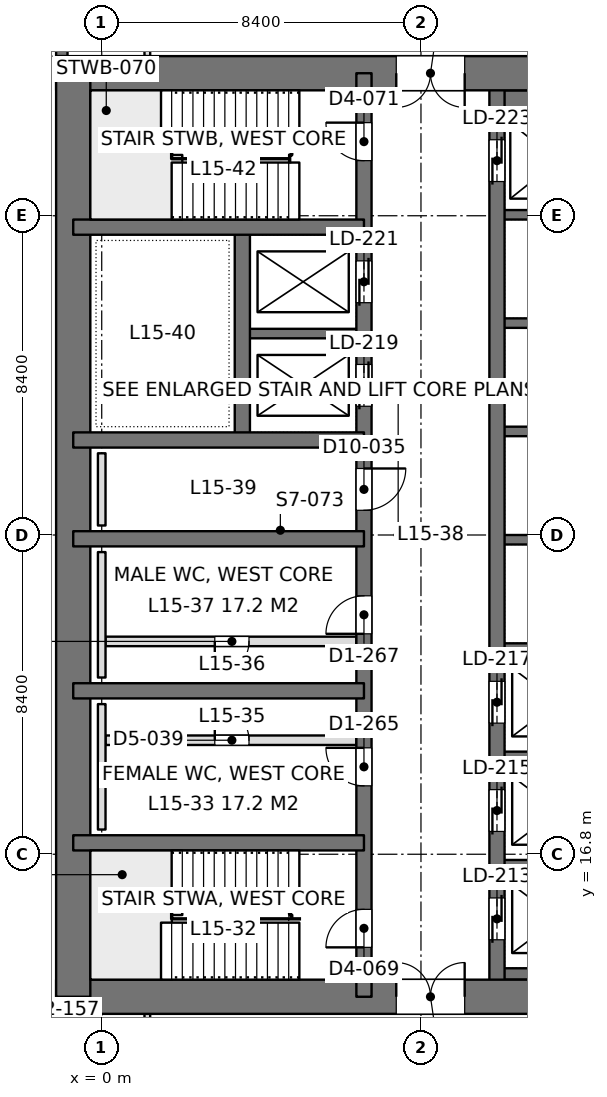
"""IFC4 building model, lengths in metres.
Left out: names, types, materials, properties, quantities, classifications, styles, units other than length and angle.
Written with IfcOpenShell. Run it as: python <this file> out.ifc"""

import sys

from ifc_helpers import new_model, si_unit, direction, frame, frame_2d, origin, place, context, subcontext, project, spatial, rectangle, extrude, element, fill, save


model = new_model("IFC4")
c1 = context("Model", 3, precision=1e-05, world=origin(), true_north=direction((0.0, 1.0)))
c2 = subcontext(c1, "Body", "Model", "MODEL_VIEW")
j1 = project(units=[si_unit("LENGTHUNIT", "METRE"), si_unit("PLANEANGLEUNIT", "RADIAN")], contexts=[c1])
p1 = place(None, origin())
s1 = spatial("IfcSite", under=j1, at=p1, CompositionType="ELEMENT")
p2 = place(p1, origin())
s2 = spatial("IfcBuilding", under=s1, at=p2, CompositionType="ELEMENT")
p3 = place(p2, frame((0.0, 0.0, 68.4)))
s3 = spatial("IfcBuildingStorey", under=s2, at=p3, CompositionType="ELEMENT", Elevation=68.4)
p4 = place(p3, frame((-1.2, 13.05, 0.0), z_axis=(0.0, 0.0, 1.0), x_axis=(1.0, 0.0, 0.0)))
e1 = element("IfcWall", 1, at=p4, inside=s3, PredefinedType="SHEAR", context=c2, shape_type="SweptSolid", body=[
    extrude(rectangle(XDim=18.0, YDim=0.9, at=frame_2d((9.0, 0.0))), origin(), (0.0, 0.0, 1.0), 4.5),
])
p5 = place(p4, frame((8.95, 0.0, 0.0)))
e2 = element("IfcOpeningElement", 2, at=p5, cuts=e1, PredefinedType="OPENING", context=c2, shape_type="SweptSolid", body=[
    extrude(rectangle(XDim=1.8, YDim=2.4, at=frame_2d((0.9, 1.2))), frame((0.0, 0.46, 0.0), z_axis=(0.0, -1.0, 0.0), x_axis=(1.0, 0.0, 0.0)), (0.0, 0.0, 1.0), 0.92),
])
p6 = place(p3, frame((-1.2, 37.35, 0.0), z_axis=(0.0, 0.0, 1.0), x_axis=(1.0, 0.0, 0.0)))
e3 = element("IfcWall", 3, at=p6, inside=s3, PredefinedType="SHEAR", context=c2, shape_type="SweptSolid", body=[
    extrude(rectangle(XDim=18.0, YDim=0.9, at=frame_2d((9.0, 0.0))), origin(), (0.0, 0.0, 1.0), 4.5),
])
p7 = place(p6, frame((8.95, 0.0, 0.0)))
e4 = element("IfcOpeningElement", 4, at=p7, cuts=e3, PredefinedType="OPENING", context=c2, shape_type="SweptSolid", body=[
    extrude(rectangle(XDim=1.8, YDim=2.4, at=frame_2d((0.9, 1.2))), frame((0.0, 0.46, 0.0), z_axis=(0.0, -1.0, 0.0), x_axis=(1.0, 0.0, 0.0)), (0.0, 0.0, 1.0), 0.92),
])
p8 = place(p3, frame((-0.75, 13.05, 0.0), z_axis=(0.0, 0.0, 1.0), x_axis=(0.0, 1.0, 0.0)))
e5 = element("IfcWall", 5, at=p8, inside=s3, PredefinedType="SHEAR", context=c2, shape_type="SweptSolid", body=[
    extrude(rectangle(XDim=24.3, YDim=0.9, at=frame_2d((12.15, 0.0))), origin(), (0.0, 0.0, 1.0), 4.5),
])
p9 = place(p3, frame((6.9, 13.05, 0.0), z_axis=(0.0, 0.0, 1.0), x_axis=(0.0, 1.0, 0.0)))
e6 = element("IfcWall", 6, at=p9, inside=s3, PredefinedType="SHEAR", context=c2, shape_type="SweptSolid", body=[
    extrude(rectangle(XDim=24.3, YDim=0.4, at=frame_2d((12.15, 0.0))), origin(), (0.0, 0.0, 1.0), 4.5),
])
p10 = place(p9, frame((1.3, 0.0, 0.0)))
e7 = element("IfcOpeningElement", 7, at=p10, cuts=e6, PredefinedType="OPENING", context=c2, shape_type="SweptSolid", body=[
    extrude(rectangle(XDim=1.0, YDim=2.2, at=frame_2d((0.5, 1.1))), frame((0.0, 0.21, 0.0), z_axis=(0.0, -1.0, 0.0), x_axis=(1.0, 0.0, 0.0)), (0.0, 0.0, 1.0), 0.42),
])
p11 = place(p9, frame((22.0, 0.0, 0.0)))
e8 = element("IfcOpeningElement", 8, at=p11, cuts=e6, PredefinedType="OPENING", context=c2, shape_type="SweptSolid", body=[
    extrude(rectangle(XDim=1.0, YDim=2.2, at=frame_2d((0.5, 1.1))), frame((0.0, 0.21, 0.0), z_axis=(0.0, -1.0, 0.0), x_axis=(1.0, 0.0, 0.0)), (0.0, 0.0, 1.0), 0.42),
])
p12 = place(p9, frame((5.55, 0.0, 0.0)))
e9 = element("IfcOpeningElement", 9, at=p12, cuts=e6, PredefinedType="OPENING", context=c2, shape_type="SweptSolid", body=[
    extrude(rectangle(XDim=1.0, YDim=2.2, at=frame_2d((0.5, 1.1))), frame((0.0, 0.21, 0.0), z_axis=(0.0, -1.0, 0.0), x_axis=(1.0, 0.0, 0.0)), (0.0, 0.0, 1.0), 0.42),
])
p13 = place(p9, frame((9.55, 0.0, 0.0)))
e10 = element("IfcOpeningElement", 10, at=p13, cuts=e6, PredefinedType="OPENING", context=c2, shape_type="SweptSolid", body=[
    extrude(rectangle(XDim=1.0, YDim=2.2, at=frame_2d((0.5, 1.1))), frame((0.0, 0.21, 0.0), z_axis=(0.0, -1.0, 0.0), x_axis=(1.0, 0.0, 0.0)), (0.0, 0.0, 1.0), 0.42),
])
p14 = place(p9, frame((12.8, 0.0, 0.0)))
e11 = element("IfcOpeningElement", 11, at=p14, cuts=e6, PredefinedType="OPENING", context=c2, shape_type="SweptSolid", body=[
    extrude(rectangle(XDim=1.1, YDim=2.2, at=frame_2d((0.55, 1.1))), frame((0.0, 0.21, 0.0), z_axis=(0.0, -1.0, 0.0), x_axis=(1.0, 0.0, 0.0)), (0.0, 0.0, 1.0), 0.42),
])
p15 = place(p9, frame((15.538, 0.0, 0.0)))
e12 = element("IfcOpeningElement", 12, at=p15, cuts=e6, PredefinedType="OPENING", context=c2, shape_type="SweptSolid", body=[
    extrude(rectangle(XDim=1.1, YDim=2.2, at=frame_2d((0.55, 1.1))), frame((0.0, 0.21, 0.0), z_axis=(0.0, -1.0, 0.0), x_axis=(1.0, 0.0, 0.0)), (0.0, 0.0, 1.0), 0.42),
])
p16 = place(p9, frame((18.262, 0.0, 0.0)))
e13 = element("IfcOpeningElement", 13, at=p16, cuts=e6, PredefinedType="OPENING", context=c2, shape_type="SweptSolid", body=[
    extrude(rectangle(XDim=1.1, YDim=2.2, at=frame_2d((0.55, 1.1))), frame((0.0, 0.21, 0.0), z_axis=(0.0, -1.0, 0.0), x_axis=(1.0, 0.0, 0.0)), (0.0, 0.0, 1.0), 0.42),
])
p17 = place(p3, frame((10.4, 13.05, 0.0), z_axis=(0.0, 0.0, 1.0), x_axis=(0.0, 1.0, 0.0)))
e14 = element("IfcWall", 14, at=p17, inside=s3, PredefinedType="SHEAR", context=c2, shape_type="SweptSolid", body=[
    extrude(rectangle(XDim=24.3, YDim=0.4, at=frame_2d((12.15, 0.0))), origin(), (0.0, 0.0, 1.0), 4.5),
])
p18 = place(p17, frame((1.5, 0.0, 0.0)))
e15 = element("IfcOpeningElement", 15, at=p18, cuts=e14, PredefinedType="OPENING", context=c2, shape_type="SweptSolid", body=[
    extrude(rectangle(XDim=1.1, YDim=2.2, at=frame_2d((0.55, 1.1))), frame((0.0, 0.21, 0.0), z_axis=(0.0, -1.0, 0.0), x_axis=(1.0, 0.0, 0.0)), (0.0, 0.0, 1.0), 0.42),
])
p19 = place(p17, frame((4.35, 0.0, 0.0)))
e16 = element("IfcOpeningElement", 16, at=p19, cuts=e14, PredefinedType="OPENING", context=c2, shape_type="SweptSolid", body=[
    extrude(rectangle(XDim=1.1, YDim=2.2, at=frame_2d((0.55, 1.1))), frame((0.0, 0.21, 0.0), z_axis=(0.0, -1.0, 0.0), x_axis=(1.0, 0.0, 0.0)), (0.0, 0.0, 1.0), 0.42),
])
p20 = place(p17, frame((7.2, 0.0, 0.0)))
e17 = element("IfcOpeningElement", 17, at=p20, cuts=e14, PredefinedType="OPENING", context=c2, shape_type="SweptSolid", body=[
    extrude(rectangle(XDim=1.1, YDim=2.2, at=frame_2d((0.55, 1.1))), frame((0.0, 0.21, 0.0), z_axis=(0.0, -1.0, 0.0), x_axis=(1.0, 0.0, 0.0)), (0.0, 0.0, 1.0), 0.42),
])
p21 = place(p17, frame((21.45, 0.0, 0.0)))
e18 = element("IfcOpeningElement", 18, at=p21, cuts=e14, PredefinedType="OPENING", context=c2, shape_type="SweptSolid", body=[
    extrude(rectangle(XDim=1.1, YDim=2.2, at=frame_2d((0.55, 1.1))), frame((0.0, 0.21, 0.0), z_axis=(0.0, -1.0, 0.0), x_axis=(1.0, 0.0, 0.0)), (0.0, 0.0, 1.0), 0.42),
])
for number, where, z_axis, x_axis in (
    (19, (-0.75, 17.1, 0.0), (0.0, 0.0, 1.0), (1.0, 0.0, 0.0)),
    (20, (-0.75, 21.1, 0.0), (0.0, 0.0, 1.0), (1.0, 0.0, 0.0)),
    (21, (-0.75, 25.1, 0.0), (0.0, 0.0, 1.0), (1.0, 0.0, 0.0)),
    (22, (-0.75, 27.7, 0.0), (0.0, 0.0, 1.0), (1.0, 0.0, 0.0)),
    (23, (-0.75, 33.3, 0.0), (0.0, 0.0, 1.0), (1.0, 0.0, 0.0)),
):
    element("IfcWall", number, at=place(p3, frame(where, z_axis=z_axis, x_axis=x_axis)), inside=s3, PredefinedType="SHEAR", context=c2, shape_type="SweptSolid", body=[
        extrude(rectangle(XDim=7.65, YDim=0.4, at=frame_2d((3.825, 0.0))), origin(), (0.0, 0.0, 1.0), 4.5),
    ])
p22 = place(p3, frame((3.7, 27.7, 0.0), z_axis=(0.0, 0.0, 1.0), x_axis=(0.0, 1.0, 0.0)))
e24 = element("IfcWall", 24, at=p22, inside=s3, PredefinedType="SHEAR", context=c2, shape_type="SweptSolid", body=[
    extrude(rectangle(XDim=5.6, YDim=0.4, at=frame_2d((2.8, 0.0))), origin(), (0.0, 0.0, 1.0), 4.5),
])
p23 = place(p3, frame((3.7, 30.5, 0.0), z_axis=(0.0, 0.0, 1.0), x_axis=(1.0, 0.0, 0.0)))
e25 = element("IfcWall", 25, at=p23, inside=s3, PredefinedType="SHEAR", context=c2, shape_type="SweptSolid", body=[
    extrude(rectangle(XDim=3.2, YDim=0.25, at=frame_2d((1.6, 0.0))), origin(), (0.0, 0.0, 1.0), 4.5),
])
p24 = place(p3, frame((10.4, 13.65, 0.0), z_axis=(0.0, 0.0, 1.0), x_axis=(1.0, 0.0, 0.0)))
e26 = element("IfcWall", 26, at=p24, inside=s3, PredefinedType="SHEAR", context=c2, shape_type="SweptSolid", body=[
    extrude(rectangle(XDim=3.2, YDim=0.3, at=frame_2d((1.6, 0.0))), origin(), (0.0, 0.0, 1.0), 4.5),
])
for number, where, z_axis, x_axis in (
    (27, (10.4, 16.525, 0.0), (0.0, 0.0, 1.0), (1.0, 0.0, 0.0)),
    (28, (10.4, 19.375, 0.0), (0.0, 0.0, 1.0), (1.0, 0.0, 0.0)),
    (29, (10.4, 22.225, 0.0), (0.0, 0.0, 1.0), (1.0, 0.0, 0.0)),
    (30, (10.4, 25.075, 0.0), (0.0, 0.0, 1.0), (1.0, 0.0, 0.0)),
    (31, (10.4, 27.925, 0.0), (0.0, 0.0, 1.0), (1.0, 0.0, 0.0)),
    (32, (10.4, 30.775, 0.0), (0.0, 0.0, 1.0), (1.0, 0.0, 0.0)),
    (33, (10.4, 33.625, 0.0), (0.0, 0.0, 1.0), (1.0, 0.0, 0.0)),
):
    element("IfcWall", number, at=place(p3, frame(where, z_axis=z_axis, x_axis=x_axis)), inside=s3, PredefinedType="SHEAR", context=c2, shape_type="SweptSolid", body=[
        extrude(rectangle(XDim=3.2, YDim=0.25, at=frame_2d((1.6, 0.0))), origin(), (0.0, 0.0, 1.0), 4.5),
    ])
p25 = place(p3, frame((10.4, 36.625, 0.0), z_axis=(0.0, 0.0, 1.0), x_axis=(1.0, 0.0, 0.0)))
e34 = element("IfcWall", 34, at=p25, inside=s3, PredefinedType="SHEAR", context=c2, shape_type="SweptSolid", body=[
    extrude(rectangle(XDim=3.2, YDim=0.55, at=frame_2d((1.6, 0.0))), origin(), (0.0, 0.0, 1.0), 4.5),
])
p26 = place(p3, frame((-1.05, 8.4, 0.0), z_axis=(0.0, 0.0, 1.0), x_axis=(0.0, 1.0, 0.0)))
e35 = element("IfcWall", 35, at=p26, inside=s3, PredefinedType="SOLIDWALL", context=c2, shape_type="SweptSolid", body=[
    extrude(rectangle(XDim=4.2, YDim=0.3, at=frame_2d((2.1, 0.0))), origin(), (0.0, 0.0, 1.0), 4.34),
])
p27 = place(p26, frame((0.9, 0.0, 0.9)))
e36 = element("IfcOpeningElement", 36, at=p27, cuts=e35, PredefinedType="OPENING", context=c2, shape_type="SweptSolid", body=[
    extrude(rectangle(XDim=2.4, YDim=1.9, at=frame_2d((1.2, 0.95))), frame((0.0, 0.16, 0.0), z_axis=(0.0, -1.0, 0.0), x_axis=(1.0, 0.0, 0.0)), (0.0, 0.0, 1.0), 0.32),
])
p28 = place(p3, frame((-1.05, 37.8, 0.0), z_axis=(0.0, 0.0, 1.0), x_axis=(0.0, 1.0, 0.0)))
e37 = element("IfcWall", 37, at=p28, inside=s3, PredefinedType="SOLIDWALL", context=c2, shape_type="SweptSolid", body=[
    extrude(rectangle(XDim=4.2, YDim=0.3, at=frame_2d((2.1, 0.0))), origin(), (0.0, 0.0, 1.0), 4.34),
])
p29 = place(p28, frame((0.9, 0.0, 0.9)))
e38 = element("IfcOpeningElement", 38, at=p29, cuts=e37, PredefinedType="OPENING", context=c2, shape_type="SweptSolid", body=[
    extrude(rectangle(XDim=2.4, YDim=1.9, at=frame_2d((1.2, 0.95))), frame((0.0, 0.16, 0.0), z_axis=(0.0, -1.0, 0.0), x_axis=(1.0, 0.0, 0.0)), (0.0, 0.0, 1.0), 0.32),
])
p30 = place(p3, frame((1.2, 10.0, 0.0), z_axis=(0.0, 0.0, 1.0), x_axis=(0.0, 1.0, 0.0)))
e39 = element("IfcWall", 39, at=p30, inside=s3, PredefinedType="PARTITIONING", context=c2, shape_type="SweptSolid", body=[
    extrude(rectangle(XDim=2.602, YDim=0.15, at=frame_2d((1.301, 0.0))), origin(), (0.0, 0.0, 1.0), 4.34),
])
p31 = place(p3, frame((1.2, 37.8, 0.0), z_axis=(0.0, 0.0, 1.0), x_axis=(0.0, 1.0, 0.0)))
e40 = element("IfcWall", 40, at=p31, inside=s3, PredefinedType="PARTITIONING", context=c2, shape_type="SweptSolid", body=[
    extrude(rectangle(XDim=2.6, YDim=0.15, at=frame_2d((1.3, 0.0))), origin(), (0.0, 0.0, 1.0), 4.34),
])
p32 = place(p3, frame((0.1, 22.4, 0.0), z_axis=(0.0, 0.0, 1.0), x_axis=(1.0, 0.0, 0.0)))
e41 = element("IfcWall", 41, at=p32, inside=s3, PredefinedType="PARTITIONING", context=c2, shape_type="SweptSolid", body=[
    extrude(rectangle(XDim=6.6, YDim=0.25, at=frame_2d((3.3, 0.0))), origin(), (0.0, 0.0, 1.0), 4.3),
])
p33 = place(p32, frame((2.875, 0.0, 0.0)))
e42 = element("IfcOpeningElement", 42, at=p33, cuts=e41, PredefinedType="OPENING", context=c2, shape_type="SweptSolid", body=[
    extrude(rectangle(XDim=0.9, YDim=2.2, at=frame_2d((0.45, 1.1))), frame((0.0, 0.135, 0.0), z_axis=(0.0, -1.0, 0.0), x_axis=(1.0, 0.0, 0.0)), (0.0, 0.0, 1.0), 0.27),
])
p34 = place(p3, frame((0.1, 19.8, 0.0), z_axis=(0.0, 0.0, 1.0), x_axis=(1.0, 0.0, 0.0)))
e43 = element("IfcWall", 43, at=p34, inside=s3, PredefinedType="PARTITIONING", context=c2, shape_type="SweptSolid", body=[
    extrude(rectangle(XDim=6.6, YDim=0.25, at=frame_2d((3.3, 0.0))), origin(), (0.0, 0.0, 1.0), 4.3),
])
p35 = place(p34, frame((2.875, 0.0, 0.0)))
e44 = element("IfcOpeningElement", 44, at=p35, cuts=e43, PredefinedType="OPENING", context=c2, shape_type="SweptSolid", body=[
    extrude(rectangle(XDim=0.9, YDim=2.2, at=frame_2d((0.45, 1.1))), frame((0.0, 0.135, 0.0), z_axis=(0.0, -1.0, 0.0), x_axis=(1.0, 0.0, 0.0)), (0.0, 0.0, 1.0), 0.27),
])
for number, where, z_axis, x_axis in (
    (45, (0.0, 17.45, 0.0), (0.0, 0.0, 1.0), (0.0, 1.0, 0.0)),
    (46, (0.0, 21.45, 0.0), (0.0, 0.0, 1.0), (0.0, 1.0, 0.0)),
):
    element("IfcWall", number, at=place(p3, frame(where, z_axis=z_axis, x_axis=x_axis)), inside=s3, PredefinedType="PLUMBINGWALL", context=c2, shape_type="SweptSolid", body=[
        extrude(rectangle(XDim=3.3, YDim=0.2, at=frame_2d((1.65, 0.0))), origin(), (0.0, 0.0, 1.0), 1.2),
    ])
p36 = place(p3, frame((0.0, 25.45, 0.0), z_axis=(0.0, 0.0, 1.0), x_axis=(0.0, 1.0, 0.0)))
e47 = element("IfcWall", 47, at=p36, inside=s3, PredefinedType="PLUMBINGWALL", context=c2, shape_type="SweptSolid", body=[
    extrude(rectangle(XDim=1.9, YDim=0.2, at=frame_2d((0.95, 0.0))), origin(), (0.0, 0.0, 1.0), 1.2),
])
p37 = place(p5, origin())
e48 = element("IfcDoor", 48, at=p37, inside=s3, OperationType="DOUBLE_DOOR_SINGLE_SWING", PredefinedType="DOOR", context=c2, shape_type="SweptSolid", body=[
    extrude(rectangle(XDim=1.8, YDim=2.4, at=frame_2d((0.9, 1.2))), frame((0.0, 0.025, 0.0), z_axis=(0.0, -1.0, 0.0), x_axis=(1.0, 0.0, 0.0)), (0.0, 0.0, 1.0), 0.05),
])
fill(e2, e48)
p38 = place(p7, frame((1.8, 0.0, 0.0), z_axis=(0.0, 0.0, 1.0), x_axis=(-1.0, 0.0, 0.0)))
e49 = element("IfcDoor", 49, at=p38, inside=s3, OperationType="DOUBLE_DOOR_SINGLE_SWING", PredefinedType="DOOR", context=c2, shape_type="SweptSolid", body=[
    extrude(rectangle(XDim=1.8, YDim=2.4, at=frame_2d((0.9, 1.2))), frame((0.0, 0.025, 0.0), z_axis=(0.0, -1.0, 0.0), x_axis=(1.0, 0.0, 0.0)), (0.0, 0.0, 1.0), 0.05),
])
fill(e4, e49)
p39 = place(p10, origin())
e50 = element("IfcDoor", 50, at=p39, inside=s3, OperationType="SINGLE_SWING_LEFT", PredefinedType="DOOR", context=c2, shape_type="SweptSolid", body=[
    extrude(rectangle(XDim=1.0, YDim=2.2, at=frame_2d((0.5, 1.1))), frame((0.0, 0.025, 0.0), z_axis=(0.0, -1.0, 0.0), x_axis=(1.0, 0.0, 0.0)), (0.0, 0.0, 1.0), 0.05),
])
fill(e7, e50)
p40 = place(p11, origin())
e51 = element("IfcDoor", 51, at=p40, inside=s3, OperationType="SINGLE_SWING_RIGHT", PredefinedType="DOOR", context=c2, shape_type="SweptSolid", body=[
    extrude(rectangle(XDim=1.0, YDim=2.2, at=frame_2d((0.5, 1.1))), frame((0.0, 0.025, 0.0), z_axis=(0.0, -1.0, 0.0), x_axis=(1.0, 0.0, 0.0)), (0.0, 0.0, 1.0), 0.05),
])
fill(e8, e51)
p41 = place(p12, origin())
e52 = element("IfcDoor", 52, at=p41, inside=s3, OperationType="SINGLE_SWING_RIGHT", PredefinedType="DOOR", context=c2, shape_type="SweptSolid", body=[
    extrude(rectangle(XDim=1.0, YDim=2.2, at=frame_2d((0.5, 1.1))), frame((0.0, 0.025, 0.0), z_axis=(0.0, -1.0, 0.0), x_axis=(1.0, 0.0, 0.0)), (0.0, 0.0, 1.0), 0.05),
])
fill(e9, e52)
p42 = place(p13, origin())
e53 = element("IfcDoor", 53, at=p42, inside=s3, OperationType="SINGLE_SWING_LEFT", PredefinedType="DOOR", context=c2, shape_type="SweptSolid", body=[
    extrude(rectangle(XDim=1.0, YDim=2.2, at=frame_2d((0.5, 1.1))), frame((0.0, 0.025, 0.0), z_axis=(0.0, -1.0, 0.0), x_axis=(1.0, 0.0, 0.0)), (0.0, 0.0, 1.0), 0.05),
])
fill(e10, e53)
p43 = place(p14, frame((1.1, 0.0, 0.0), z_axis=(0.0, 0.0, 1.0), x_axis=(-1.0, 0.0, 0.0)))
e54 = element("IfcDoor", 54, at=p43, inside=s3, OperationType="SINGLE_SWING_LEFT", PredefinedType="DOOR", context=c2, shape_type="SweptSolid", body=[
    extrude(rectangle(XDim=1.1, YDim=2.2, at=frame_2d((0.55, 1.1))), frame((0.0, 0.025, 0.0), z_axis=(0.0, -1.0, 0.0), x_axis=(1.0, 0.0, 0.0)), (0.0, 0.0, 1.0), 0.05),
])
fill(e11, e54)
p44 = place(p18, origin())
e55 = element("IfcDoor", 55, at=p44, inside=s3, OperationType="DOUBLE_DOOR_SLIDING", PredefinedType="DOOR", context=c2, shape_type="SweptSolid", body=[
    extrude(rectangle(XDim=1.1, YDim=2.2, at=frame_2d((0.55, 1.1))), frame((0.0, 0.025, 0.0), z_axis=(0.0, -1.0, 0.0), x_axis=(1.0, 0.0, 0.0)), (0.0, 0.0, 1.0), 0.05),
])
fill(e15, e55)
p45 = place(p19, origin())
e56 = element("IfcDoor", 56, at=p45, inside=s3, OperationType="DOUBLE_DOOR_SLIDING", PredefinedType="DOOR", context=c2, shape_type="SweptSolid", body=[
    extrude(rectangle(XDim=1.1, YDim=2.2, at=frame_2d((0.55, 1.1))), frame((0.0, 0.025, 0.0), z_axis=(0.0, -1.0, 0.0), x_axis=(1.0, 0.0, 0.0)), (0.0, 0.0, 1.0), 0.05),
])
fill(e16, e56)
p46 = place(p20, origin())
e57 = element("IfcDoor", 57, at=p46, inside=s3, OperationType="DOUBLE_DOOR_SLIDING", PredefinedType="DOOR", context=c2, shape_type="SweptSolid", body=[
    extrude(rectangle(XDim=1.1, YDim=2.2, at=frame_2d((0.55, 1.1))), frame((0.0, 0.025, 0.0), z_axis=(0.0, -1.0, 0.0), x_axis=(1.0, 0.0, 0.0)), (0.0, 0.0, 1.0), 0.05),
])
fill(e17, e57)
p47 = place(p21, origin())
e58 = element("IfcDoor", 58, at=p47, inside=s3, OperationType="DOUBLE_DOOR_SLIDING", PredefinedType="DOOR", context=c2, shape_type="SweptSolid", body=[
    extrude(rectangle(XDim=1.1, YDim=2.2, at=frame_2d((0.55, 1.1))), frame((0.0, 0.025, 0.0), z_axis=(0.0, -1.0, 0.0), x_axis=(1.0, 0.0, 0.0)), (0.0, 0.0, 1.0), 0.05),
])
fill(e18, e58)
p48 = place(p15, origin())
e59 = element("IfcDoor", 59, at=p48, inside=s3, OperationType="DOUBLE_DOOR_SLIDING", PredefinedType="DOOR", context=c2, shape_type="SweptSolid", body=[
    extrude(rectangle(XDim=1.1, YDim=2.2, at=frame_2d((0.55, 1.1))), frame((0.0, 0.025, 0.0), z_axis=(0.0, -1.0, 0.0), x_axis=(1.0, 0.0, 0.0)), (0.0, 0.0, 1.0), 0.05),
])
fill(e12, e59)
p49 = place(p16, origin())
e60 = element("IfcDoor", 60, at=p49, inside=s3, OperationType="DOUBLE_DOOR_SLIDING", PredefinedType="DOOR", context=c2, shape_type="SweptSolid", body=[
    extrude(rectangle(XDim=1.1, YDim=2.2, at=frame_2d((0.55, 1.1))), frame((0.0, 0.025, 0.0), z_axis=(0.0, -1.0, 0.0), x_axis=(1.0, 0.0, 0.0)), (0.0, 0.0, 1.0), 0.05),
])
fill(e13, e60)
p50 = place(p33, frame((0.9, 0.0, 0.0), z_axis=(0.0, 0.0, 1.0), x_axis=(-1.0, 0.0, 0.0)))
e61 = element("IfcDoor", 61, at=p50, inside=s3, OperationType="SINGLE_SWING_RIGHT", PredefinedType="DOOR", context=c2, shape_type="SweptSolid", body=[
    extrude(rectangle(XDim=0.9, YDim=2.2, at=frame_2d((0.45, 1.1))), frame((0.0, 0.025, 0.0), z_axis=(0.0, -1.0, 0.0), x_axis=(1.0, 0.0, 0.0)), (0.0, 0.0, 1.0), 0.05),
])
fill(e42, e61)
p51 = place(p35, origin())
e62 = element("IfcDoor", 62, at=p51, inside=s3, OperationType="SINGLE_SWING_LEFT", PredefinedType="DOOR", context=c2, shape_type="SweptSolid", body=[
    extrude(rectangle(XDim=0.9, YDim=2.2, at=frame_2d((0.45, 1.1))), frame((0.0, 0.025, 0.0), z_axis=(0.0, -1.0, 0.0), x_axis=(1.0, 0.0, 0.0)), (0.0, 0.0, 1.0), 0.05),
])
fill(e44, e62)
save(model, sys.argv[1])
